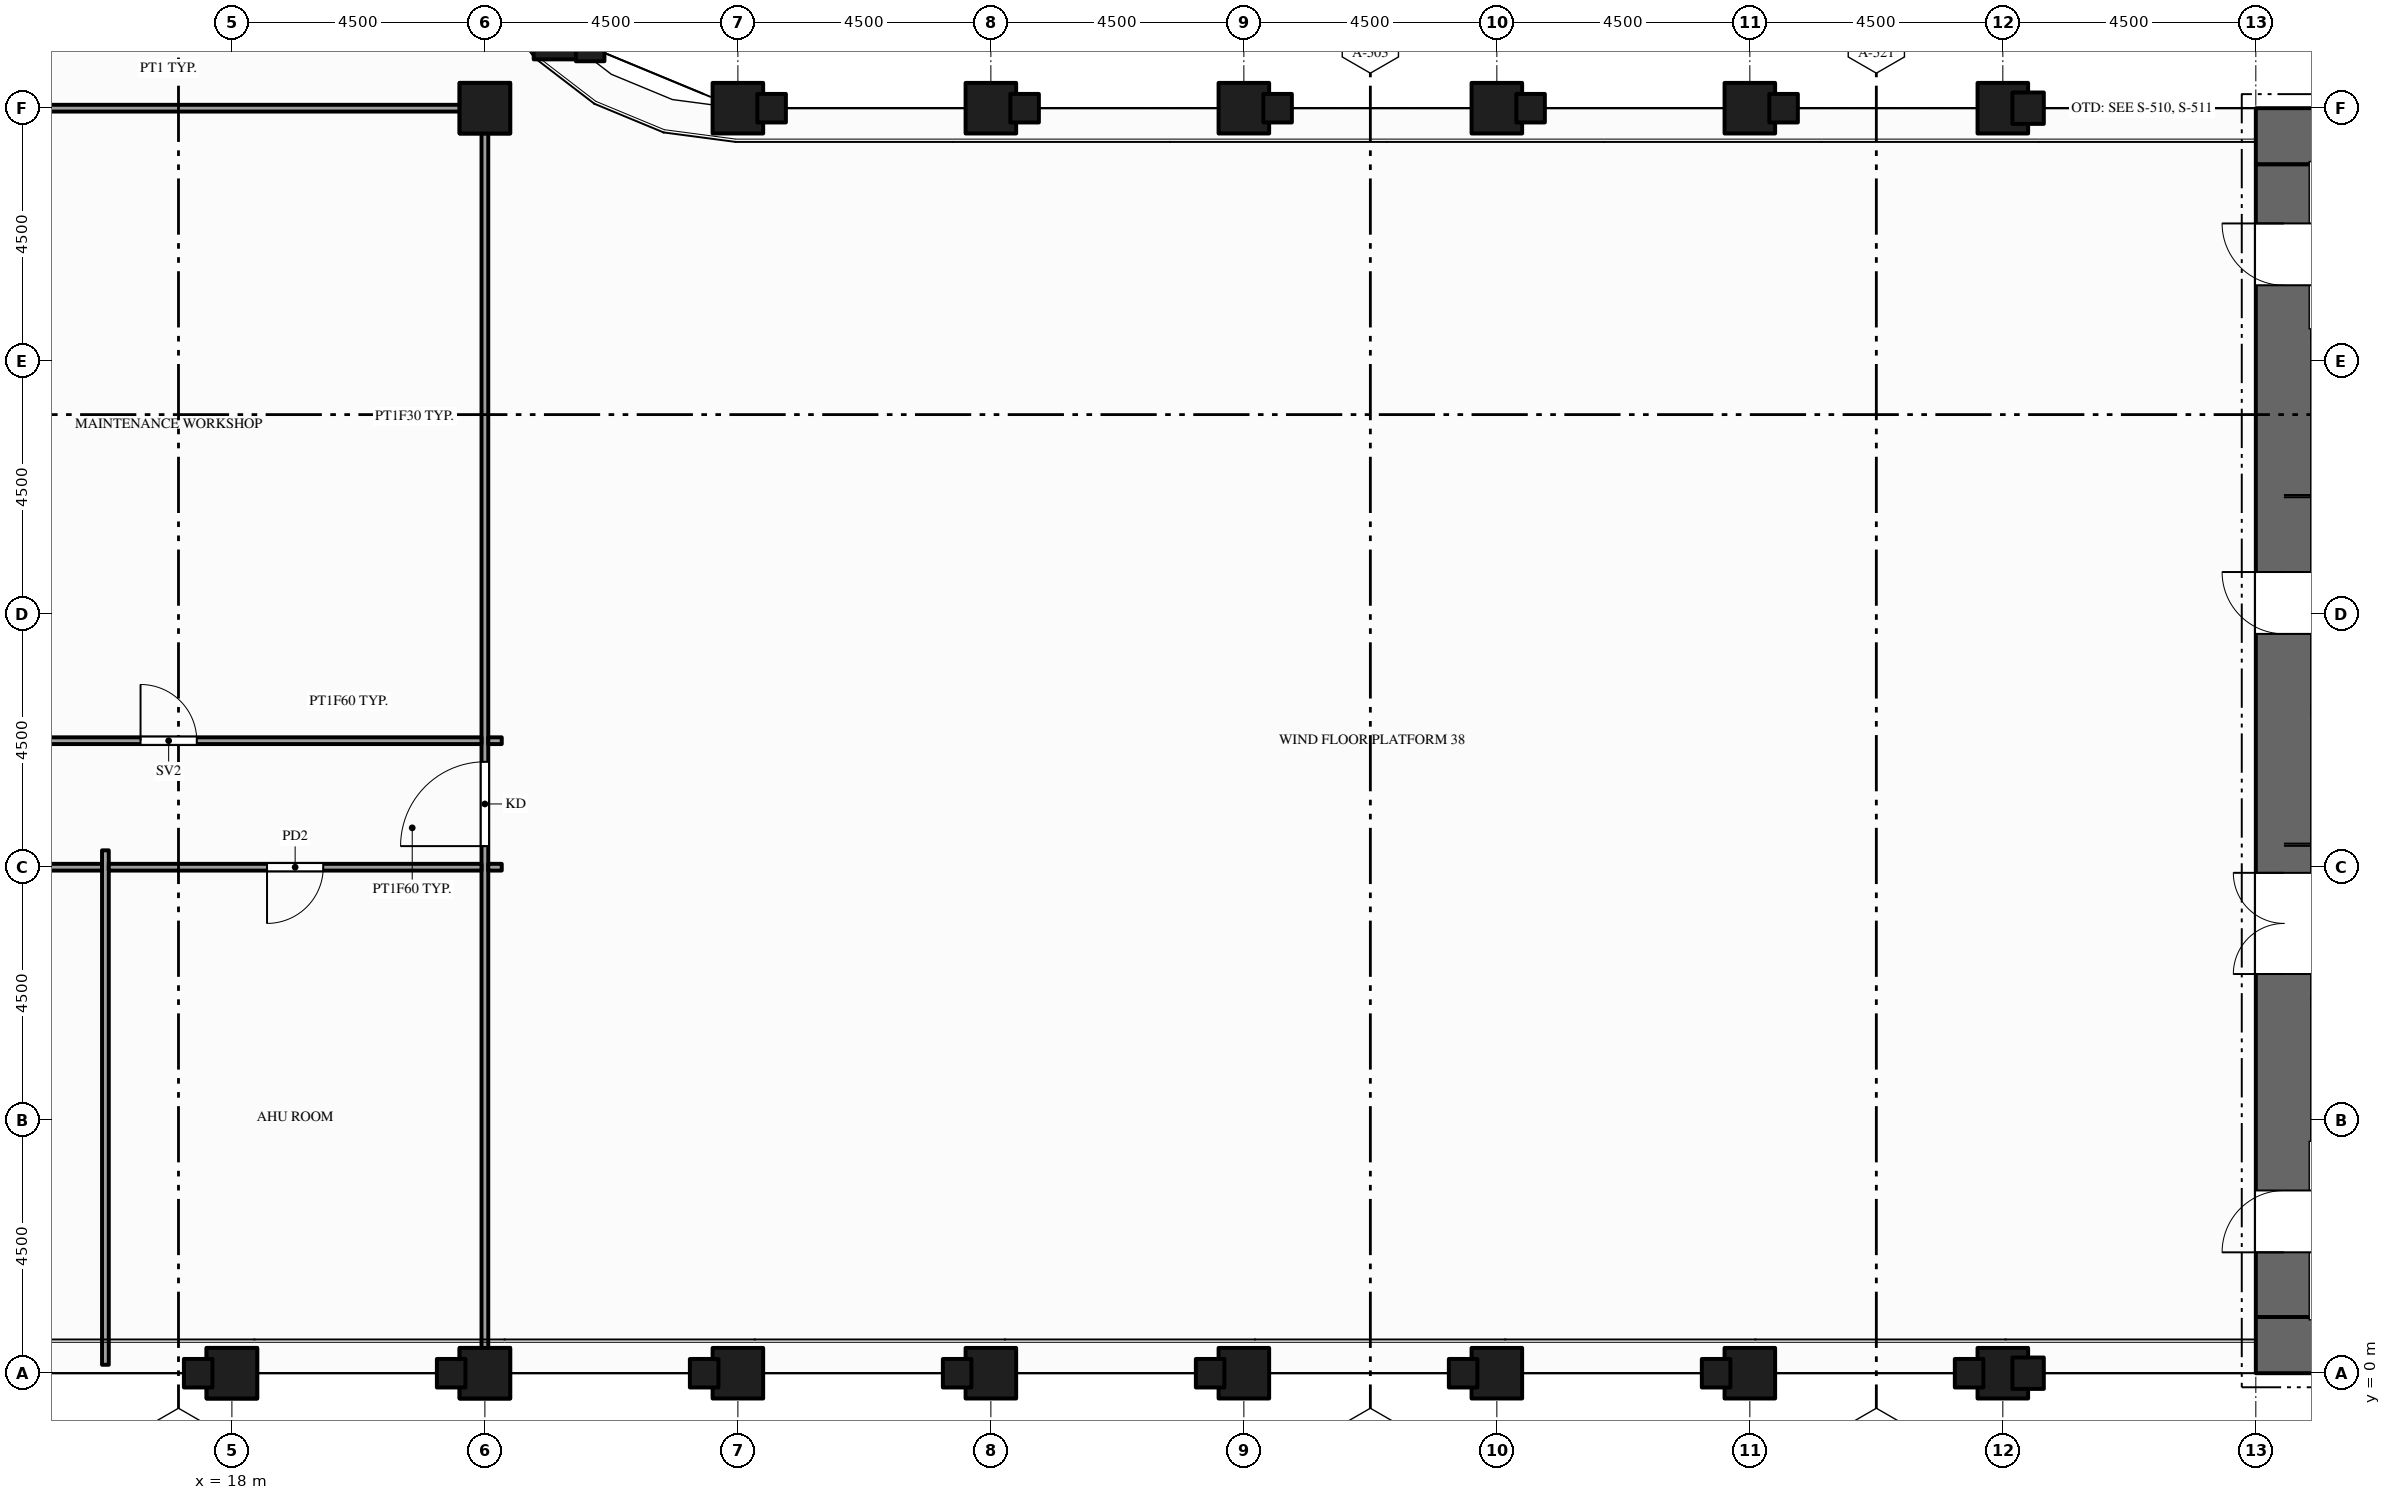
"""IFC4 building model, lengths in metres.
Left out: names, types, materials, properties, quantities, classifications, styles, units other than length and angle.
Written with IfcOpenShell. Run it as: python <this file> out.ifc"""

import sys

from ifc_helpers import new_model, si_unit, direction, frame, frame_2d, origin, origin_2d, place, context, subcontext, project, spatial, rectangle, hollow_rectangle, extrude, element, fill, save


model = new_model("IFC4")
c1 = context("Model", 3, precision=1e-05, world=origin(), true_north=direction((0.0, 1.0)))
c2 = subcontext(c1, "Body", "Model", "MODEL_VIEW")
j1 = project(units=[si_unit("LENGTHUNIT", "METRE"), si_unit("PLANEANGLEUNIT", "RADIAN")], contexts=[c1])
p1 = place(None, origin())
s1 = spatial("IfcSite", under=j1, at=p1, CompositionType="ELEMENT")
p2 = place(p1, origin())
s2 = spatial("IfcBuilding", under=s1, at=p2, CompositionType="ELEMENT")
p3 = place(p2, frame((0.0, 0.0, 187.0)))
s3 = spatial("IfcBuildingStorey", under=s2, at=p3, CompositionType="ELEMENT", Elevation=187.0)
for number, where, z_axis, x_axis in (
    (1, (67.5, 0.5, -0.15), (0.0, 0.0, 1.0), (-1.0, 0.0, 0.0)),
    (2, (54.0, 22.0, -0.15), (0.0, 0.0, 1.0), (1.0, 0.0, 0.0)),
):
    element("IfcWall", number, at=place(p3, frame(where, z_axis=z_axis, x_axis=x_axis)), inside=s3, PredefinedType="SHEAR", context=c2, shape_type="SweptSolid", body=[
        extrude(rectangle(XDim=13.5, YDim=1.0, at=frame_2d((6.75, 0.0))), origin(), (0.0, 0.0, 1.0), 8.0),
    ])
p4 = place(p3, frame((54.5, 1.0, -0.15), z_axis=(0.0, 0.0, 1.0), x_axis=(0.0, 1.0, 0.0)))
e3 = element("IfcWall", 3, at=p4, inside=s3, PredefinedType="SHEAR", context=c2, shape_type="SweptSolid", body=[
    extrude(rectangle(XDim=20.5, YDim=1.0, at=frame_2d((10.25, 0.0))), origin(), (0.0, 0.0, 1.0), 8.0),
])
p5 = place(p4, frame((6.1, 0.0, 0.15)))
e4 = element("IfcOpeningElement", 4, at=p5, cuts=e3, PredefinedType="OPENING", context=c2, shape_type="SweptSolid", body=[
    extrude(rectangle(XDim=1.8, YDim=2.1, at=frame_2d((0.9, 1.05))), frame((0.0, 0.51, 0.0), z_axis=(0.0, -1.0, 0.0), x_axis=(1.0, 0.0, 0.0)), (0.0, 0.0, 1.0), 1.02),
])
p6 = place(p4, frame((12.15, 0.0, 0.15)))
e5 = element("IfcOpeningElement", 5, at=p6, cuts=e3, PredefinedType="OPENING", context=c2, shape_type="SweptSolid", body=[
    extrude(rectangle(XDim=1.1, YDim=2.1, at=frame_2d((0.55, 1.05))), frame((0.0, 0.51, 0.0), z_axis=(0.0, -1.0, 0.0), x_axis=(1.0, 0.0, 0.0)), (0.0, 0.0, 1.0), 1.02),
])
p7 = place(p4, frame((1.15, 0.0, 0.15)))
e6 = element("IfcOpeningElement", 6, at=p7, cuts=e3, PredefinedType="OPENING", context=c2, shape_type="SweptSolid", body=[
    extrude(rectangle(XDim=1.1, YDim=2.1, at=frame_2d((0.55, 1.05))), frame((0.0, 0.51, 0.0), z_axis=(0.0, -1.0, 0.0), x_axis=(1.0, 0.0, 0.0)), (0.0, 0.0, 1.0), 1.02),
])
p8 = place(p4, frame((18.35, 0.0, 0.15)))
e7 = element("IfcOpeningElement", 7, at=p8, cuts=e3, PredefinedType="OPENING", context=c2, shape_type="SweptSolid", body=[
    extrude(rectangle(XDim=1.1, YDim=2.1, at=frame_2d((0.55, 1.05))), frame((0.0, 0.51, 0.0), z_axis=(0.0, -1.0, 0.0), x_axis=(1.0, 0.0, 0.0)), (0.0, 0.0, 1.0), 1.02),
])
p9 = place(p3, frame((18.0, 0.0, -0.25), z_axis=(0.0, 0.0, 1.0), x_axis=(1.0, 0.0, 0.0)))
e8 = element("IfcColumn", 8, at=p9, inside=s3, PredefinedType="COLUMN", context=c2, shape_type="SweptSolid", body=[
    extrude(hollow_rectangle(XDim=0.9, YDim=0.9, WallThickness=0.045, at=origin_2d()), origin(), (0.0, 0.0, 1.0), 6.6),
])
p10 = place(p3, frame((18.0, 0.0, 6.35), z_axis=(0.0, 0.0, 1.0), x_axis=(1.0, 0.0, 0.0)))
e9 = element("IfcColumn", 9, at=p10, inside=s3, PredefinedType="COLUMN", context=c2, shape_type="SweptSolid", body=[
    extrude(rectangle(XDim=0.9, YDim=0.9, at=origin_2d()), origin(), (0.0, 0.0, 1.0), 1.5),
])
p11 = place(p3, frame((22.5, 0.0, -0.25), z_axis=(0.0, 0.0, 1.0), x_axis=(1.0, 0.0, 0.0)))
e10 = element("IfcColumn", 10, at=p11, inside=s3, PredefinedType="COLUMN", context=c2, shape_type="SweptSolid", body=[
    extrude(hollow_rectangle(XDim=0.9, YDim=0.9, WallThickness=0.045, at=origin_2d()), origin(), (0.0, 0.0, 1.0), 6.6),
])
p12 = place(p3, frame((22.5, 0.0, 6.35), z_axis=(0.0, 0.0, 1.0), x_axis=(1.0, 0.0, 0.0)))
e11 = element("IfcColumn", 11, at=p12, inside=s3, PredefinedType="COLUMN", context=c2, shape_type="SweptSolid", body=[
    extrude(rectangle(XDim=0.9, YDim=0.9, at=origin_2d()), origin(), (0.0, 0.0, 1.0), 1.5),
])
p13 = place(p3, frame((22.5, 22.5, -0.25), z_axis=(0.0, 0.0, 1.0), x_axis=(1.0, 0.0, 0.0)))
e12 = element("IfcColumn", 12, at=p13, inside=s3, PredefinedType="COLUMN", context=c2, shape_type="SweptSolid", body=[
    extrude(hollow_rectangle(XDim=0.9, YDim=0.9, WallThickness=0.045, at=origin_2d()), origin(), (0.0, 0.0, 1.0), 6.6),
])
p14 = place(p3, frame((22.5, 22.5, 6.35), z_axis=(0.0, 0.0, 1.0), x_axis=(1.0, 0.0, 0.0)))
e13 = element("IfcColumn", 13, at=p14, inside=s3, PredefinedType="COLUMN", context=c2, shape_type="SweptSolid", body=[
    extrude(rectangle(XDim=0.9, YDim=0.9, at=origin_2d()), origin(), (0.0, 0.0, 1.0), 1.5),
])
for number, where, z_axis, x_axis in (
    (14, (23.818, 23.818, -0.25), (0.0, 0.0, 1.0), (1.0, 0.0, 0.0)),
    (15, (27.0, 0.0, -0.25), (0.0, 0.0, 1.0), (1.0, 0.0, 0.0)),
    (16, (27.0, 22.5, -0.25), (0.0, 0.0, 1.0), (1.0, 0.0, 0.0)),
    (17, (31.5, 0.0, -0.25), (0.0, 0.0, 1.0), (1.0, 0.0, 0.0)),
    (18, (31.5, 22.5, -0.25), (0.0, 0.0, 1.0), (1.0, 0.0, 0.0)),
    (19, (36.0, 0.0, -0.25), (0.0, 0.0, 1.0), (1.0, 0.0, 0.0)),
    (20, (36.0, 22.5, -0.25), (0.0, 0.0, 1.0), (1.0, 0.0, 0.0)),
    (21, (40.5, 0.0, -0.25), (0.0, 0.0, 1.0), (1.0, 0.0, 0.0)),
    (22, (40.5, 22.5, -0.25), (0.0, 0.0, 1.0), (1.0, 0.0, 0.0)),
    (23, (45.0, 0.0, -0.25), (0.0, 0.0, 1.0), (1.0, 0.0, 0.0)),
    (24, (45.0, 22.5, -0.25), (0.0, 0.0, 1.0), (1.0, 0.0, 0.0)),
    (25, (49.5, 0.0, -0.25), (0.0, 0.0, 1.0), (1.0, 0.0, 0.0)),
    (26, (49.5, 22.5, -0.25), (0.0, 0.0, 1.0), (1.0, 0.0, 0.0)),
):
    element("IfcColumn", number, at=place(p3, frame(where, z_axis=z_axis, x_axis=x_axis)), inside=s3, PredefinedType="COLUMN", context=c2, shape_type="SweptSolid", body=[
        extrude(hollow_rectangle(XDim=0.9, YDim=0.9, WallThickness=0.045, at=origin_2d()), origin(), (0.0, 0.0, 1.0), 8.1),
    ])
p15 = place(p3, frame((15.75, 0.15, 0.0), z_axis=(0.0, 0.0, 1.0), x_axis=(0.0, 1.0, 0.0)))
e27 = element("IfcWall", 27, at=p15, inside=s3, PredefinedType="PARTITIONING", context=c2, shape_type="SweptSolid", body=[
    extrude(rectangle(XDim=9.15, YDim=0.12, at=frame_2d((4.575, 0.0))), origin(), (0.0, 0.0, 1.0), 6.87),
])
p16 = place(p3, frame((22.5, 0.15, 0.0), z_axis=(0.0, 0.0, 1.0), x_axis=(0.0, 1.0, 0.0)))
e28 = element("IfcWall", 28, at=p16, inside=s3, PredefinedType="PARTITIONING", context=c2, shape_type="SweptSolid", body=[
    extrude(rectangle(XDim=22.65, YDim=0.12, at=frame_2d((11.325, 0.0))), origin(), (0.0, 0.0, 1.0), 6.87),
])
p17 = place(p16, frame((9.225, 0.0, 0.0)))
e29 = element("IfcOpeningElement", 29, at=p17, cuts=e28, PredefinedType="OPENING", context=c2, shape_type="SweptSolid", body=[
    extrude(rectangle(XDim=1.5, YDim=2.1, at=frame_2d((0.75, 1.05))), frame((0.0, 0.07, 0.0), z_axis=(0.0, -1.0, 0.0), x_axis=(1.0, 0.0, 0.0)), (0.0, 0.0, 1.0), 0.14),
])
p18 = place(p3, frame((9.06, 9.0, 0.0), z_axis=(0.0, 0.0, 1.0), x_axis=(1.0, 0.0, 0.0)))
e30 = element("IfcWall", 30, at=p18, inside=s3, PredefinedType="PARTITIONING", context=c2, shape_type="SweptSolid", body=[
    extrude(rectangle(XDim=6.63, YDim=0.12, at=frame_2d((3.315, 0.0))), origin(), (0.0, 0.0, 1.0), 6.87),
])
p19 = place(p18, frame((2.815, 0.0, 0.0)))
e31 = element("IfcOpeningElement", 31, at=p19, cuts=e30, PredefinedType="OPENING", context=c2, shape_type="SweptSolid", body=[
    extrude(rectangle(XDim=1.0, YDim=2.1, at=frame_2d((0.5, 1.05))), frame((0.0, 0.07, 0.0), z_axis=(0.0, -1.0, 0.0), x_axis=(1.0, 0.0, 0.0)), (0.0, 0.0, 1.0), 0.14),
])
p20 = place(p3, frame((15.81, 9.0, 0.0), z_axis=(0.0, 0.0, 1.0), x_axis=(1.0, 0.0, 0.0)))
e32 = element("IfcWall", 32, at=p20, inside=s3, PredefinedType="PARTITIONING", context=c2, shape_type="SweptSolid", body=[
    extrude(rectangle(XDim=6.63, YDim=0.12, at=frame_2d((3.315, 0.0))), origin(), (0.0, 0.0, 1.0), 6.87),
])
p21 = place(p20, frame((2.815, 0.0, 0.0)))
e33 = element("IfcOpeningElement", 33, at=p21, cuts=e32, PredefinedType="OPENING", context=c2, shape_type="SweptSolid", body=[
    extrude(rectangle(XDim=1.0, YDim=2.1, at=frame_2d((0.5, 1.05))), frame((0.0, 0.07, 0.0), z_axis=(0.0, -1.0, 0.0), x_axis=(1.0, 0.0, 0.0)), (0.0, 0.0, 1.0), 0.14),
])
p22 = place(p3, frame((22.56, 9.0, 0.0), z_axis=(0.0, 0.0, 1.0), x_axis=(1.0, 0.0, 0.0)))
e34 = element("IfcWall", 34, at=p22, inside=s3, PredefinedType="PARTITIONING", context=c2, shape_type="SweptSolid", body=[
    extrude(rectangle(XDim=0.24, YDim=0.12, at=frame_2d((0.12, 0.0))), origin(), (0.0, 0.0, 1.0), 6.87),
])
p23 = place(p3, frame((55.0, 9.4, 0.0), z_axis=(0.0, 0.0, 1.0), x_axis=(1.0, 0.0, 0.0)))
e35 = element("IfcWall", 35, at=p23, inside=s3, PredefinedType="SOLIDWALL", context=c2, shape_type="SweptSolid", body=[
    extrude(rectangle(XDim=2.3, YDim=0.2, at=frame_2d((1.15, 0.0))), origin(), (0.0, 0.0, 1.0), 7.85),
])
p24 = place(p23, frame((0.6, 0.0, 0.012)))
e36 = element("IfcOpeningElement", 36, at=p24, cuts=e35, PredefinedType="OPENING", context=c2, shape_type="SweptSolid", body=[
    extrude(rectangle(XDim=1.1, YDim=2.1, at=frame_2d((0.55, 1.05))), frame((0.0, 0.11, 0.0), z_axis=(0.0, -1.0, 0.0), x_axis=(1.0, 0.0, 0.0)), (0.0, 0.0, 1.0), 0.22),
])
p25 = place(p3, frame((11.31, 11.25, 0.0), z_axis=(0.0, 0.0, 1.0), x_axis=(1.0, 0.0, 0.0)))
e37 = element("IfcWall", 37, at=p25, inside=s3, PredefinedType="PARTITIONING", context=c2, shape_type="SweptSolid", body=[
    extrude(rectangle(XDim=11.13, YDim=0.12, at=frame_2d((5.565, 0.0))), origin(), (0.0, 0.0, 1.0), 6.87),
])
p26 = place(p25, frame((5.065, 0.0, 0.0)))
e38 = element("IfcOpeningElement", 38, at=p26, cuts=e37, PredefinedType="OPENING", context=c2, shape_type="SweptSolid", body=[
    extrude(rectangle(XDim=1.0, YDim=2.1, at=frame_2d((0.5, 1.05))), frame((0.0, 0.07, 0.0), z_axis=(0.0, -1.0, 0.0), x_axis=(1.0, 0.0, 0.0)), (0.0, 0.0, 1.0), 0.14),
])
p27 = place(p3, frame((22.56, 11.25, 0.0), z_axis=(0.0, 0.0, 1.0), x_axis=(1.0, 0.0, 0.0)))
e39 = element("IfcWall", 39, at=p27, inside=s3, PredefinedType="PARTITIONING", context=c2, shape_type="SweptSolid", body=[
    extrude(rectangle(XDim=0.24, YDim=0.12, at=frame_2d((0.12, 0.0))), origin(), (0.0, 0.0, 1.0), 6.87),
])
p28 = place(p3, frame((55.0, 11.8, 0.0), z_axis=(0.0, 0.0, 1.0), x_axis=(1.0, 0.0, 0.0)))
e40 = element("IfcWall", 40, at=p28, inside=s3, PredefinedType="SOLIDWALL", context=c2, shape_type="SweptSolid", body=[
    extrude(rectangle(XDim=2.3, YDim=0.2, at=frame_2d((1.15, 0.0))), origin(), (0.0, 0.0, 1.0), 7.85),
])
p29 = place(p3, frame((55.0, 15.6, 0.0), z_axis=(0.0, 0.0, 1.0), x_axis=(1.0, 0.0, 0.0)))
e41 = element("IfcWall", 41, at=p29, inside=s3, PredefinedType="SOLIDWALL", context=c2, shape_type="SweptSolid", body=[
    extrude(rectangle(XDim=2.3, YDim=0.2, at=frame_2d((1.15, 0.0))), origin(), (0.0, 0.0, 1.0), 7.85),
])
p30 = place(p29, frame((0.6, 0.0, 0.012)))
e42 = element("IfcOpeningElement", 42, at=p30, cuts=e41, PredefinedType="OPENING", context=c2, shape_type="SweptSolid", body=[
    extrude(rectangle(XDim=1.1, YDim=2.1, at=frame_2d((0.55, 1.05))), frame((0.0, 0.11, 0.0), z_axis=(0.0, -1.0, 0.0), x_axis=(1.0, 0.0, 0.0)), (0.0, 0.0, 1.0), 0.22),
])
p31 = place(p3, frame((11.31, 22.5, 0.0), z_axis=(0.0, 0.0, 1.0), x_axis=(1.0, 0.0, 0.0)))
e43 = element("IfcWall", 43, at=p31, inside=s3, PredefinedType="PARTITIONING", context=c2, shape_type="SweptSolid", body=[
    extrude(rectangle(XDim=11.13, YDim=0.12, at=frame_2d((5.565, 0.0))), origin(), (0.0, 0.0, 1.0), 6.6),
])
p32 = place(p3, frame((22.56, 22.5, 0.0), z_axis=(0.0, 0.0, 1.0), x_axis=(1.0, 0.0, 0.0)))
e44 = element("IfcWall", 44, at=p32, inside=s3, PredefinedType="PARTITIONING", context=c2, shape_type="SweptSolid", body=[
    extrude(rectangle(XDim=0.24, YDim=0.12, at=frame_2d((0.12, 0.0))), origin(), (0.0, 0.0, 1.0), 7.85),
])
p33 = place(p5, origin())
e45 = element("IfcDoor", 45, at=p33, inside=s3, OperationType="DOUBLE_DOOR_SINGLE_SWING", PredefinedType="DOOR", context=c2, shape_type="SweptSolid", body=[
    extrude(rectangle(XDim=1.8, YDim=2.1, at=frame_2d((0.9, 1.05))), frame((0.0, 0.025, 0.0), z_axis=(0.0, -1.0, 0.0), x_axis=(1.0, 0.0, 0.0)), (0.0, 0.0, 1.0), 0.05),
])
fill(e4, e45)
p34 = place(p6, origin())
e46 = element("IfcDoor", 46, at=p34, inside=s3, OperationType="SINGLE_SWING_RIGHT", PredefinedType="DOOR", context=c2, shape_type="SweptSolid", body=[
    extrude(rectangle(XDim=1.1, YDim=2.1, at=frame_2d((0.55, 1.05))), frame((0.0, 0.025, 0.0), z_axis=(0.0, -1.0, 0.0), x_axis=(1.0, 0.0, 0.0)), (0.0, 0.0, 1.0), 0.05),
])
fill(e5, e46)
p35 = place(p7, origin())
e47 = element("IfcDoor", 47, at=p35, inside=s3, OperationType="SINGLE_SWING_LEFT", PredefinedType="DOOR", context=c2, shape_type="SweptSolid", body=[
    extrude(rectangle(XDim=1.1, YDim=2.1, at=frame_2d((0.55, 1.05))), frame((0.0, 0.025, 0.0), z_axis=(0.0, -1.0, 0.0), x_axis=(1.0, 0.0, 0.0)), (0.0, 0.0, 1.0), 0.05),
])
fill(e6, e47)
p36 = place(p8, origin())
e48 = element("IfcDoor", 48, at=p36, inside=s3, OperationType="SINGLE_SWING_RIGHT", PredefinedType="DOOR", context=c2, shape_type="SweptSolid", body=[
    extrude(rectangle(XDim=1.1, YDim=2.1, at=frame_2d((0.55, 1.05))), frame((0.0, 0.025, 0.0), z_axis=(0.0, -1.0, 0.0), x_axis=(1.0, 0.0, 0.0)), (0.0, 0.0, 1.0), 0.05),
])
fill(e7, e48)
p37 = place(p21, origin())
e49 = element("IfcDoor", 49, at=p37, inside=s3, OperationType="SINGLE_SWING_LEFT", PredefinedType="DOOR", context=c2, shape_type="SweptSolid", body=[
    extrude(rectangle(XDim=1.0, YDim=2.1, at=frame_2d((0.5, 1.05))), frame((0.0, 0.025, 0.0), z_axis=(0.0, -1.0, 0.0), x_axis=(1.0, 0.0, 0.0)), (0.0, 0.0, 1.0), 0.05),
])
fill(e33, e49)
p38 = place(p26, origin())
e50 = element("IfcDoor", 50, at=p38, inside=s3, OperationType="SINGLE_SWING_LEFT", PredefinedType="DOOR", context=c2, shape_type="SweptSolid", body=[
    extrude(rectangle(XDim=1.0, YDim=2.1, at=frame_2d((0.5, 1.05))), frame((0.0, 0.025, 0.0), z_axis=(0.0, -1.0, 0.0), x_axis=(1.0, 0.0, 0.0)), (0.0, 0.0, 1.0), 0.05),
])
fill(e38, e50)
p39 = place(p17, origin())
e51 = element("IfcDoor", 51, at=p39, inside=s3, OperationType="SINGLE_SWING_LEFT", PredefinedType="DOOR", context=c2, shape_type="SweptSolid", body=[
    extrude(rectangle(XDim=1.5, YDim=2.1, at=frame_2d((0.75, 1.05))), frame((0.0, 0.025, 0.0), z_axis=(0.0, -1.0, 0.0), x_axis=(1.0, 0.0, 0.0)), (0.0, 0.0, 1.0), 0.05),
])
fill(e29, e51)
save(model, sys.argv[1])
